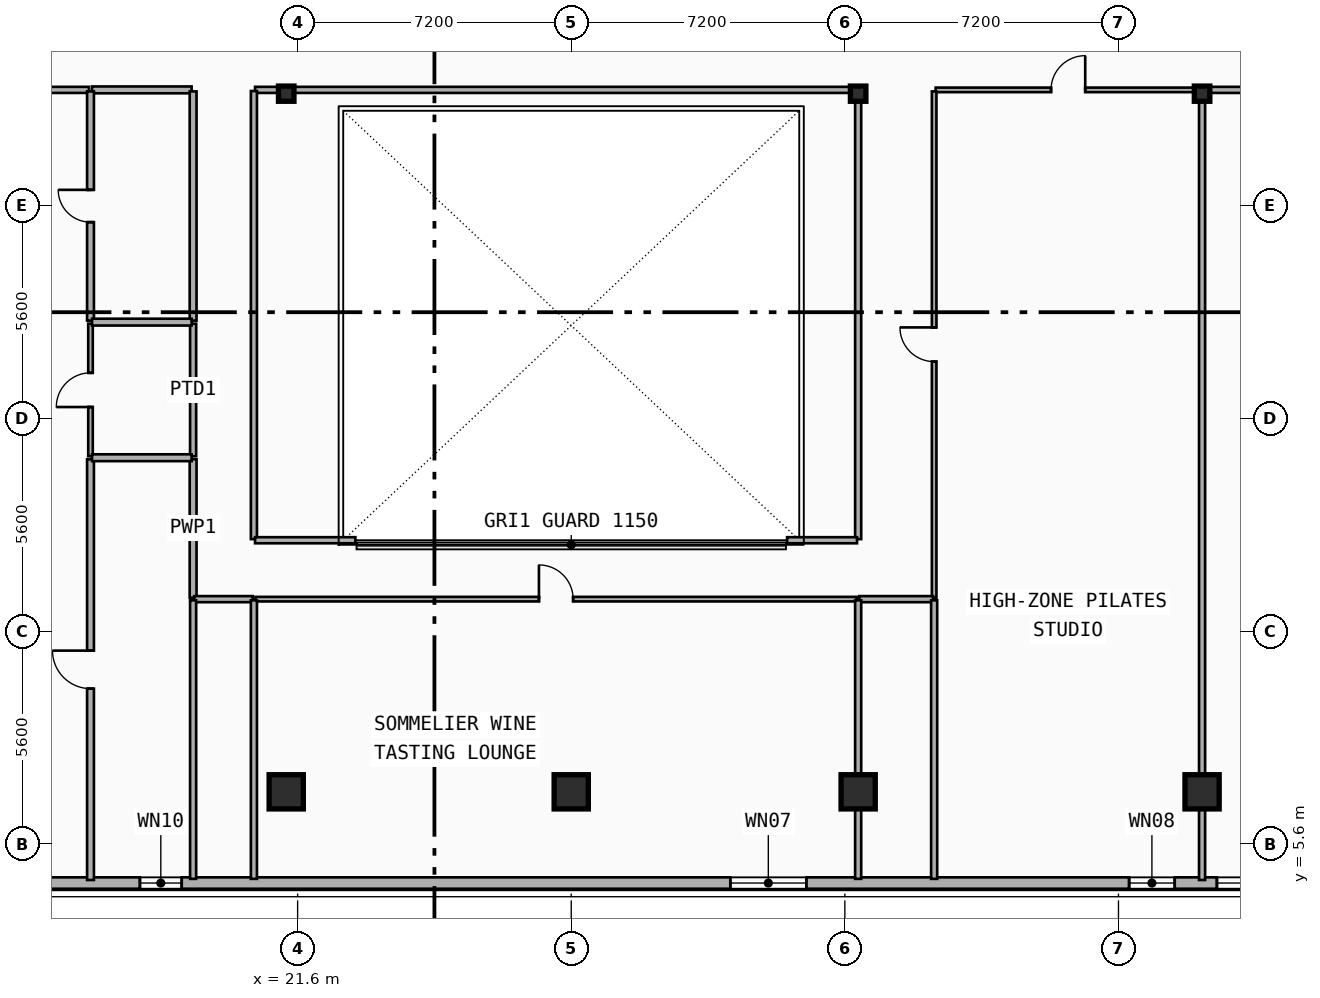
"""IFC4 building model, lengths in metres.
Left out: names, types, materials, properties, quantities, classifications, styles, units other than length and angle.
Written with IfcOpenShell. Run it as: python <this file> out.ifc"""

import sys

from ifc_helpers import new_model, si_unit, direction, frame, frame_2d, origin, origin_2d, place, context, subcontext, project, spatial, rectangle, i_section, extrude, element, fill, save


model = new_model("IFC4")
c1 = context("Model", 3, precision=1e-05, world=origin(), true_north=direction((0.0, 1.0)))
c2 = subcontext(c1, "Body", "Model", "MODEL_VIEW")
j1 = project(units=[si_unit("LENGTHUNIT", "METRE"), si_unit("PLANEANGLEUNIT", "RADIAN")], contexts=[c1])
p1 = place(None, origin())
s1 = spatial("IfcSite", under=j1, at=p1, CompositionType="ELEMENT")
p2 = place(p1, origin())
s2 = spatial("IfcBuilding", under=s1, at=p2, CompositionType="ELEMENT")
p3 = place(p2, frame((0.0, 0.0, 211.2)))
s3 = spatial("IfcBuildingStorey", under=s2, at=p3, CompositionType="ELEMENT", Elevation=211.2)
for number, where, z_axis, x_axis in (
    (1, (21.3, 25.35, 0.0), (0.0, 0.0, 1.0), (1.0, 0.0, 0.0)),
    (2, (36.35, 25.35, 0.0), (0.0, 0.0, 1.0), (1.0, 0.0, 0.0)),
    (3, (45.4, 25.35, 0.0), (0.0, 0.0, 1.0), (1.0, 0.0, 0.0)),
):
    element("IfcColumn", number, at=place(p3, frame(where, z_axis=z_axis, x_axis=x_axis)), inside=s3, PredefinedType="COLUMN", context=c2, shape_type="SweptSolid", body=[
        extrude(i_section(OverallWidth=0.408, OverallDepth=0.4, WebThickness=0.025, FlangeThickness=0.039, FilletRadius=0.015, at=origin_2d()), origin(), (0.0, 0.0, 1.0), 3.6),
    ])
for number, where, z_axis, x_axis in (
    (4, (21.3, 7.089, 0.0), (0.0, -0.09, 0.996), (1.0, 0.0, 0.0)),
    (5, (28.8, 7.089, 0.0), (0.0, -0.09, 0.996), (1.0, 0.0, 0.0)),
    (6, (36.35, 7.089, 0.0), (0.0, -0.09, 0.996), (1.0, 0.0, 0.0)),
    (7, (45.4, 7.089, 0.0), (0.0, -0.09, 0.996), (1.0, 0.0, 0.0)),
):
    element("IfcColumn", number, at=place(p3, frame(where, z_axis=z_axis, x_axis=x_axis)), inside=s3, PredefinedType="COLUMN", context=c2, shape_type="SweptSolid", body=[
        extrude(rectangle(XDim=0.9, YDim=0.9, at=origin_2d()), origin(), (0.0, 0.0, 1.0), 3.615),
    ])
p4 = place(p3, frame((48.0, 4.58, 0.0), z_axis=(0.0, 0.0, 1.0), x_axis=(-1.0, 0.0, 0.0)))
e8 = element("IfcWall", 8, at=p4, inside=s3, PredefinedType="SOLIDWALL", context=c2, shape_type="SweptSolid", body=[
    extrude(rectangle(XDim=38.4, YDim=0.3, at=frame_2d((19.2, 0.0))), origin(), (0.0, 0.0, 1.0), 3.34),
])
p5 = place(p4, frame((33.709, 0.0, 0.34)))
e9 = element("IfcOpeningElement", 9, at=p5, cuts=e8, PredefinedType="OPENING", context=c2, shape_type="SweptSolid", body=[
    extrude(rectangle(XDim=1.4, YDim=1.8, at=frame_2d((0.7, 0.9))), frame((0.0, 0.16, 0.0), z_axis=(0.0, -1.0, 0.0), x_axis=(1.0, 0.0, 0.0)), (0.0, 0.0, 1.0), 0.32),
])
p6 = place(p4, frame((29.45, 0.0, 1.85)))
e10 = element("IfcOpeningElement", 10, at=p6, cuts=e8, PredefinedType="OPENING", context=c2, shape_type="SweptSolid", body=[
    extrude(rectangle(XDim=1.1, YDim=0.9, at=frame_2d((0.55, 0.45))), frame((0.0, 0.16, 0.0), z_axis=(0.0, -1.0, 0.0), x_axis=(1.0, 0.0, 0.0)), (0.0, 0.0, 1.0), 0.32),
])
p7 = place(p4, frame((35.994, 0.0, 0.48)))
e11 = element("IfcOpeningElement", 11, at=p7, cuts=e8, PredefinedType="OPENING", context=c2, shape_type="SweptSolid", body=[
    extrude(rectangle(XDim=1.8, YDim=1.8, at=frame_2d((0.9, 0.9))), frame((0.0, 0.16, 0.0), z_axis=(0.0, -1.0, 0.0), x_axis=(1.0, 0.0, 0.0)), (0.0, 0.0, 1.0), 0.32),
])
p8 = place(p4, frame((13.014, 0.0, 0.65)))
e12 = element("IfcOpeningElement", 12, at=p8, cuts=e8, PredefinedType="OPENING", context=c2, shape_type="SweptSolid", body=[
    extrude(rectangle(XDim=2.0, YDim=2.2, at=frame_2d((1.0, 1.1))), frame((0.0, 0.16, 0.0), z_axis=(0.0, -1.0, 0.0), x_axis=(1.0, 0.0, 0.0)), (0.0, 0.0, 1.0), 0.32),
])
p9 = place(p4, frame((3.32, 0.0, 1.05)))
e13 = element("IfcOpeningElement", 13, at=p9, cuts=e8, PredefinedType="OPENING", context=c2, shape_type="SweptSolid", body=[
    extrude(rectangle(XDim=1.2, YDim=1.5, at=frame_2d((0.6, 0.75))), frame((0.0, 0.16, 0.0), z_axis=(0.0, -1.0, 0.0), x_axis=(1.0, 0.0, 0.0)), (0.0, 0.0, 1.0), 0.32),
])
p10 = place(p4, frame((0.41, 0.0, 0.48)))
e14 = element("IfcOpeningElement", 14, at=p10, cuts=e8, PredefinedType="OPENING", context=c2, shape_type="SweptSolid", body=[
    extrude(rectangle(XDim=1.8, YDim=1.8, at=frame_2d((0.9, 0.9))), frame((0.0, 0.16, 0.0), z_axis=(0.0, -1.0, 0.0), x_axis=(1.0, 0.0, 0.0)), (0.0, 0.0, 1.0), 0.32),
])
p11 = place(p3, frame((12.631, 25.45, 0.0), z_axis=(0.0, 0.0, 1.0), x_axis=(1.0, 0.0, 0.0)))
e15 = element("IfcWall", 15, at=p11, inside=s3, PredefinedType="PARTITIONING", context=c2, shape_type="SweptSolid", body=[
    extrude(rectangle(XDim=3.479, YDim=0.16, at=frame_2d((1.74, 0.0))), origin(), (0.0, 0.0, 1.0), 2.52),
])
p12 = place(p11, frame((1.24, 0.0, 0.0)))
e16 = element("IfcOpeningElement", 16, at=p12, cuts=e15, PredefinedType="OPENING", context=c2, shape_type="SweptSolid", body=[
    extrude(rectangle(XDim=1.0, YDim=2.15, at=frame_2d((0.5, 1.075))), frame((0.0, 0.09, 0.0), z_axis=(0.0, -1.0, 0.0), x_axis=(1.0, 0.0, 0.0)), (0.0, 0.0, 1.0), 0.18),
])
p13 = place(p3, frame((16.19, 25.45, 0.0), z_axis=(0.0, 0.0, 1.0), x_axis=(1.0, 0.0, 0.0)))
e17 = element("IfcWall", 17, at=p13, inside=s3, PredefinedType="PLUMBINGWALL", context=c2, shape_type="SweptSolid", body=[
    extrude(rectangle(XDim=2.62, YDim=0.18, at=frame_2d((1.31, 0.0))), origin(), (0.0, 0.0, 1.0), 3.34),
])
p14 = place(p3, frame((38.39, 25.45, 0.0), z_axis=(0.0, 0.0, 1.0), x_axis=(1.0, 0.0, 0.0)))
e18 = element("IfcWall", 18, at=p14, inside=s3, PredefinedType="PARTITIONING", context=c2, shape_type="SweptSolid", body=[
    extrude(rectangle(XDim=6.97, YDim=0.12, at=frame_2d((3.485, 0.0))), origin(), (0.0, 0.0, 1.0), 2.52),
])
p15 = place(p14, frame((3.035, 0.0, 0.0)))
e19 = element("IfcOpeningElement", 19, at=p15, cuts=e18, PredefinedType="OPENING", context=c2, shape_type="SweptSolid", body=[
    extrude(rectangle(XDim=0.9, YDim=2.1, at=frame_2d((0.45, 1.05))), frame((0.0, 0.07, 0.0), z_axis=(0.0, -1.0, 0.0), x_axis=(1.0, 0.0, 0.0)), (0.0, 0.0, 1.0), 0.14),
])
p16 = place(p3, frame((45.44, 25.45, 0.0), z_axis=(0.0, 0.0, 1.0), x_axis=(1.0, 0.0, 0.0)))
e20 = element("IfcWall", 20, at=p16, inside=s3, PredefinedType="PARTITIONING", context=c2, shape_type="SweptSolid", body=[
    extrude(rectangle(XDim=2.994, YDim=0.16, at=frame_2d((1.497, 0.0))), origin(), (0.0, 0.0, 1.0), 2.52),
])
p17 = place(p16, frame((0.997, 0.0, 0.0)))
e21 = element("IfcOpeningElement", 21, at=p17, cuts=e20, PredefinedType="OPENING", context=c2, shape_type="SweptSolid", body=[
    extrude(rectangle(XDim=1.0, YDim=2.15, at=frame_2d((0.5, 1.075))), frame((0.0, 0.09, 0.0), z_axis=(0.0, -1.0, 0.0), x_axis=(1.0, 0.0, 0.0)), (0.0, 0.0, 1.0), 0.18),
])
p18 = place(p3, frame((18.85, 12.09, 0.0), z_axis=(0.0, 0.0, 1.0), x_axis=(0.0, 1.0, 0.0)))
e22 = element("IfcWall", 22, at=p18, inside=s3, PredefinedType="PLUMBINGWALL", context=c2, shape_type="SweptSolid", body=[
    extrude(rectangle(XDim=3.641, YDim=0.18, at=frame_2d((1.82, 0.0))), origin(), (0.0, 0.0, 1.0), 2.82),
])
p19 = place(p3, frame((18.85, 15.811, 0.0), z_axis=(0.0, 0.0, 1.0), x_axis=(0.0, 1.0, 0.0)))
e23 = element("IfcWall", 23, at=p19, inside=s3, PredefinedType="PARTITIONING", context=c2, shape_type="SweptSolid", body=[
    extrude(rectangle(XDim=3.488, YDim=0.16, at=frame_2d((1.744, 0.0))), origin(), (0.0, 0.0, 1.0), 2.97),
])
p20 = place(p3, frame((18.85, 19.379, 0.0), z_axis=(0.0, 0.0, 1.0), x_axis=(0.0, 1.0, 0.0)))
e24 = element("IfcWall", 24, at=p20, inside=s3, PredefinedType="PLUMBINGWALL", context=c2, shape_type="SweptSolid", body=[
    extrude(rectangle(XDim=6.031, YDim=0.18, at=frame_2d((3.016, 0.0))), origin(), (0.0, 0.0, 1.0), 2.82),
])
p21 = place(p3, frame((38.35, 12.09, 0.0), z_axis=(0.0, 0.0, 1.0), x_axis=(0.0, 1.0, 0.0)))
e25 = element("IfcWall", 25, at=p21, inside=s3, PredefinedType="PARTITIONING", context=c2, shape_type="SweptSolid", body=[
    extrude(rectangle(XDim=13.32, YDim=0.12, at=frame_2d((6.66, 0.0))), origin(), (0.0, 0.0, 1.0), 2.82),
])
p22 = place(p21, frame((6.21, 0.0, 0.0)))
e26 = element("IfcOpeningElement", 26, at=p22, cuts=e25, PredefinedType="OPENING", context=c2, shape_type="SweptSolid", body=[
    extrude(rectangle(XDim=0.9, YDim=2.1, at=frame_2d((0.45, 1.05))), frame((0.0, 0.07, 0.0), z_axis=(0.0, -1.0, 0.0), x_axis=(1.0, 0.0, 0.0)), (0.0, 0.0, 1.0), 0.14),
])
p23 = place(p3, frame((20.49, 12.05, 0.0), z_axis=(0.0, 0.0, 1.0), x_axis=(1.0, 0.0, 0.0)))
e27 = element("IfcWall", 27, at=p23, inside=s3, PredefinedType="PARTITIONING", context=c2, shape_type="SweptSolid", body=[
    extrude(rectangle(XDim=15.82, YDim=0.12, at=frame_2d((7.91, 0.0))), origin(), (0.0, 0.0, 1.0), 2.52),
])
p24 = place(p23, frame((7.46, 0.0, 0.0)))
e28 = element("IfcOpeningElement", 28, at=p24, cuts=e27, PredefinedType="OPENING", context=c2, shape_type="SweptSolid", body=[
    extrude(rectangle(XDim=0.9, YDim=2.1, at=frame_2d((0.45, 1.05))), frame((0.0, 0.07, 0.0), z_axis=(0.0, -1.0, 0.0), x_axis=(1.0, 0.0, 0.0)), (0.0, 0.0, 1.0), 0.14),
])
p25 = place(p3, frame((16.15, 4.66, 0.0), z_axis=(0.0, 0.0, 1.0), x_axis=(0.0, 1.0, 0.0)))
e29 = element("IfcWall", 29, at=p25, inside=s3, PredefinedType="PLUMBINGWALL", context=c2, shape_type="SweptSolid", body=[
    extrude(rectangle(XDim=11.071, YDim=0.18, at=frame_2d((5.536, 0.0))), origin(), (0.0, 0.0, 1.0), 2.82),
])
p26 = place(p25, frame((5.035, 0.0, 0.0)))
e30 = element("IfcOpeningElement", 30, at=p26, cuts=e29, PredefinedType="OPENING", context=c2, shape_type="SweptSolid", body=[
    extrude(rectangle(XDim=1.0, YDim=2.15, at=frame_2d((0.5, 1.075))), frame((0.0, 0.1, 0.0), z_axis=(0.0, -1.0, 0.0), x_axis=(1.0, 0.0, 0.0)), (0.0, 0.0, 1.0), 0.2),
])
p27 = place(p3, frame((16.15, 15.811, 0.0), z_axis=(0.0, 0.0, 1.0), x_axis=(0.0, 1.0, 0.0)))
e31 = element("IfcWall", 31, at=p27, inside=s3, PredefinedType="PARTITIONING", context=c2, shape_type="SweptSolid", body=[
    extrude(rectangle(XDim=3.488, YDim=0.12, at=frame_2d((1.744, 0.0))), origin(), (0.0, 0.0, 1.0), 2.97),
])
p28 = place(p27, frame((1.294, 0.0, 0.0)))
e32 = element("IfcOpeningElement", 32, at=p28, cuts=e31, PredefinedType="OPENING", context=c2, shape_type="SweptSolid", body=[
    extrude(rectangle(XDim=0.9, YDim=2.1, at=frame_2d((0.45, 1.05))), frame((0.0, 0.07, 0.0), z_axis=(0.0, -1.0, 0.0), x_axis=(1.0, 0.0, 0.0)), (0.0, 0.0, 1.0), 0.14),
])
p29 = place(p3, frame((16.15, 19.379, 0.0), z_axis=(0.0, 0.0, 1.0), x_axis=(0.0, 1.0, 0.0)))
e33 = element("IfcWall", 33, at=p29, inside=s3, PredefinedType="PLUMBINGWALL", context=c2, shape_type="SweptSolid", body=[
    extrude(rectangle(XDim=6.031, YDim=0.18, at=frame_2d((3.016, 0.0))), origin(), (0.0, 0.0, 1.0), 2.82),
])
p30 = place(p29, frame((2.591, 0.0, 0.0)))
e34 = element("IfcOpeningElement", 34, at=p30, cuts=e33, PredefinedType="OPENING", context=c2, shape_type="SweptSolid", body=[
    extrude(rectangle(XDim=0.85, YDim=2.1, at=frame_2d((0.425, 1.05))), frame((0.0, 0.1, 0.0), z_axis=(0.0, -1.0, 0.0), x_axis=(1.0, 0.0, 0.0)), (0.0, 0.0, 1.0), 0.2),
])
p31 = place(p3, frame((16.19, 15.771, 0.0), z_axis=(0.0, 0.0, 1.0), x_axis=(1.0, 0.0, 0.0)))
e35 = element("IfcWall", 35, at=p31, inside=s3, PredefinedType="PLUMBINGWALL", context=c2, shape_type="SweptSolid", body=[
    extrude(rectangle(XDim=2.62, YDim=0.18, at=frame_2d((1.31, 0.0))), origin(), (0.0, 0.0, 1.0), 3.34),
])
p32 = place(p3, frame((16.19, 19.339, 0.0), z_axis=(0.0, 0.0, 1.0), x_axis=(1.0, 0.0, 0.0)))
e36 = element("IfcWall", 36, at=p32, inside=s3, PredefinedType="PLUMBINGWALL", context=c2, shape_type="SweptSolid", body=[
    extrude(rectangle(XDim=2.62, YDim=0.18, at=frame_2d((1.31, 0.0))), origin(), (0.0, 0.0, 1.0), 2.97),
])
p33 = place(p3, frame((45.4, 4.66, 0.0), z_axis=(0.0, 0.0, 1.0), x_axis=(0.0, 1.0, 0.0)))
e37 = element("IfcWall", 37, at=p33, inside=s3, PredefinedType="PARTITIONING", context=c2, shape_type="SweptSolid", body=[
    extrude(rectangle(XDim=20.75, YDim=0.16, at=frame_2d((10.375, 0.0))), origin(), (0.0, 0.0, 1.0), 2.52),
])
p34 = place(p3, frame((20.48, 25.45, 0.0), z_axis=(0.0, 0.0, 1.0), x_axis=(1.0, 0.0, 0.0)))
e38 = element("IfcWall", 38, at=p34, inside=s3, PredefinedType="PARTITIONING", context=c2, shape_type="SweptSolid", body=[
    extrude(rectangle(XDim=15.84, YDim=0.16, at=frame_2d((7.92, 0.0))), origin(), (0.0, 0.0, 1.0), 2.52),
])
p35 = place(p3, frame((18.88, 12.05, 0.0), z_axis=(0.0, 0.0, 1.0), x_axis=(1.0, 0.0, 0.0)))
e39 = element("IfcWall", 39, at=p35, inside=s3, PredefinedType="PARTITIONING", context=c2, shape_type="SweptSolid", body=[
    extrude(rectangle(XDim=1.54, YDim=0.16, at=frame_2d((0.77, 0.0))), origin(), (0.0, 0.0, 1.0), 3.34),
])
p36 = place(p3, frame((20.45, 13.63, 0.0), z_axis=(0.0, 0.0, 1.0), x_axis=(0.0, 1.0, 0.0)))
e40 = element("IfcWall", 40, at=p36, inside=s3, PredefinedType="PARTITIONING", context=c2, shape_type="SweptSolid", body=[
    extrude(rectangle(XDim=11.79, YDim=0.16, at=frame_2d((5.895, 0.0))), origin(), (0.0, 0.0, 1.0), 2.82),
])
p37 = place(p3, frame((36.38, 12.05, 0.0), z_axis=(0.0, 0.0, 1.0), x_axis=(1.0, 0.0, 0.0)))
e41 = element("IfcWall", 41, at=p37, inside=s3, PredefinedType="PARTITIONING", context=c2, shape_type="SweptSolid", body=[
    extrude(rectangle(XDim=1.94, YDim=0.16, at=frame_2d((0.97, 0.0))), origin(), (0.0, 0.0, 1.0), 2.52),
])
p38 = place(p3, frame((36.35, 13.63, 0.0), z_axis=(0.0, 0.0, 1.0), x_axis=(0.0, 1.0, 0.0)))
e42 = element("IfcWall", 42, at=p38, inside=s3, PredefinedType="PARTITIONING", context=c2, shape_type="SweptSolid", body=[
    extrude(rectangle(XDim=11.79, YDim=0.16, at=frame_2d((5.895, 0.0))), origin(), (0.0, 0.0, 1.0), 2.52),
])
p39 = place(p3, frame((20.48, 13.6, 0.0), z_axis=(0.0, 0.0, 1.0), x_axis=(1.0, 0.0, 0.0)))
e43 = element("IfcWall", 43, at=p39, inside=s3, PredefinedType="PARTITIONING", context=c2, shape_type="SweptSolid", body=[
    extrude(rectangle(XDim=2.64, YDim=0.16, at=frame_2d((1.32, 0.0))), origin(), (0.0, 0.0, 1.0), 2.52),
])
p40 = place(p3, frame((34.48, 13.6, 0.0), z_axis=(0.0, 0.0, 1.0), x_axis=(1.0, 0.0, 0.0)))
e44 = element("IfcWall", 44, at=p40, inside=s3, PredefinedType="PARTITIONING", context=c2, shape_type="SweptSolid", body=[
    extrude(rectangle(XDim=1.84, YDim=0.16, at=frame_2d((0.92, 0.0))), origin(), (0.0, 0.0, 1.0), 2.52),
])
for number, where, z_axis, x_axis in (
    (45, (18.85, 4.69, 0.0), (0.0, 0.0, 1.0), (0.0, 1.0, 0.0)),
    (46, (20.45, 4.69, 0.0), (0.0, 0.0, 1.0), (0.0, 1.0, 0.0)),
):
    element("IfcWall", number, at=place(p3, frame(where, z_axis=z_axis, x_axis=x_axis)), inside=s3, PredefinedType="PARTITIONING", context=c2, shape_type="SweptSolid", body=[
        extrude(rectangle(XDim=7.33, YDim=0.16, at=frame_2d((3.665, 0.0))), origin(), (0.0, 0.0, 1.0), 2.97),
    ])
p41 = place(p3, frame((36.35, 4.69, 0.0), z_axis=(0.0, 0.0, 1.0), x_axis=(0.0, 1.0, 0.0)))
e47 = element("IfcWall", 47, at=p41, inside=s3, PredefinedType="PARTITIONING", context=c2, shape_type="SweptSolid", body=[
    extrude(rectangle(XDim=7.33, YDim=0.16, at=frame_2d((3.665, 0.0))), origin(), (0.0, 0.0, 1.0), 2.52),
])
p42 = place(p3, frame((38.35, 4.69, 0.0), z_axis=(0.0, 0.0, 1.0), x_axis=(0.0, 1.0, 0.0)))
e48 = element("IfcWall", 48, at=p42, inside=s3, PredefinedType="PARTITIONING", context=c2, shape_type="SweptSolid", body=[
    extrude(rectangle(XDim=7.33, YDim=0.16, at=frame_2d((3.665, 0.0))), origin(), (0.0, 0.0, 1.0), 2.97),
])
p43 = place(p6, origin())
e49 = element("IfcWindow", 49, at=p43, inside=s3, PartitioningType="SINGLE_PANEL", PredefinedType="WINDOW", context=c2, shape_type="SweptSolid", body=[
    extrude(rectangle(XDim=1.1, YDim=0.9, at=frame_2d((0.55, 0.45))), frame((0.0, 0.03, 0.0), z_axis=(0.0, -1.0, 0.0), x_axis=(1.0, 0.0, 0.0)), (0.0, 0.0, 1.0), 0.06),
])
fill(e10, e49)
p44 = place(p8, origin())
e50 = element("IfcWindow", 50, at=p44, inside=s3, PartitioningType="SINGLE_PANEL", PredefinedType="WINDOW", context=c2, shape_type="SweptSolid", body=[
    extrude(rectangle(XDim=2.0, YDim=2.2, at=frame_2d((1.0, 1.1))), frame((0.0, 0.03, 0.0), z_axis=(0.0, -1.0, 0.0), x_axis=(1.0, 0.0, 0.0)), (0.0, 0.0, 1.0), 0.06),
])
fill(e12, e50)
p45 = place(p9, origin())
e51 = element("IfcWindow", 51, at=p45, inside=s3, PartitioningType="SINGLE_PANEL", PredefinedType="WINDOW", context=c2, shape_type="SweptSolid", body=[
    extrude(rectangle(XDim=1.2, YDim=1.5, at=frame_2d((0.6, 0.75))), frame((0.0, 0.03, 0.0), z_axis=(0.0, -1.0, 0.0), x_axis=(1.0, 0.0, 0.0)), (0.0, 0.0, 1.0), 0.06),
])
fill(e13, e51)
p46 = place(p10, origin())
e52 = element("IfcWindow", 52, at=p46, inside=s3, PartitioningType="SINGLE_PANEL", PredefinedType="WINDOW", context=c2, shape_type="SweptSolid", body=[
    extrude(rectangle(XDim=1.8, YDim=1.8, at=frame_2d((0.9, 0.9))), frame((0.0, 0.03, 0.0), z_axis=(0.0, -1.0, 0.0), x_axis=(1.0, 0.0, 0.0)), (0.0, 0.0, 1.0), 0.06),
])
fill(e14, e52)
p47 = place(p15, origin())
e53 = element("IfcDoor", 53, at=p47, inside=s3, OperationType="SINGLE_SWING_RIGHT", PredefinedType="DOOR", context=c2, shape_type="SweptSolid", body=[
    extrude(rectangle(XDim=0.9, YDim=2.1, at=frame_2d((0.45, 1.05))), frame((0.0, 0.025, 0.0), z_axis=(0.0, -1.0, 0.0), x_axis=(1.0, 0.0, 0.0)), (0.0, 0.0, 1.0), 0.05),
])
fill(e19, e53)
p48 = place(p22, origin())
e54 = element("IfcDoor", 54, at=p48, inside=s3, OperationType="SINGLE_SWING_RIGHT", PredefinedType="DOOR", context=c2, shape_type="SweptSolid", body=[
    extrude(rectangle(XDim=0.9, YDim=2.1, at=frame_2d((0.45, 1.05))), frame((0.0, 0.025, 0.0), z_axis=(0.0, -1.0, 0.0), x_axis=(1.0, 0.0, 0.0)), (0.0, 0.0, 1.0), 0.05),
])
fill(e26, e54)
p49 = place(p24, origin())
e55 = element("IfcDoor", 55, at=p49, inside=s3, OperationType="SINGLE_SWING_LEFT", PredefinedType="DOOR", context=c2, shape_type="SweptSolid", body=[
    extrude(rectangle(XDim=0.9, YDim=2.1, at=frame_2d((0.45, 1.05))), frame((0.0, 0.025, 0.0), z_axis=(0.0, -1.0, 0.0), x_axis=(1.0, 0.0, 0.0)), (0.0, 0.0, 1.0), 0.05),
])
fill(e28, e55)
p50 = place(p26, origin())
e56 = element("IfcDoor", 56, at=p50, inside=s3, OperationType="SINGLE_SWING_RIGHT", PredefinedType="DOOR", context=c2, shape_type="SweptSolid", body=[
    extrude(rectangle(XDim=1.0, YDim=2.15, at=frame_2d((0.5, 1.075))), frame((0.0, 0.025, 0.0), z_axis=(0.0, -1.0, 0.0), x_axis=(1.0, 0.0, 0.0)), (0.0, 0.0, 1.0), 0.05),
])
fill(e30, e56)
p51 = place(p28, origin())
e57 = element("IfcDoor", 57, at=p51, inside=s3, OperationType="SINGLE_SWING_LEFT", PredefinedType="DOOR", context=c2, shape_type="SweptSolid", body=[
    extrude(rectangle(XDim=0.9, YDim=2.1, at=frame_2d((0.45, 1.05))), frame((0.0, 0.025, 0.0), z_axis=(0.0, -1.0, 0.0), x_axis=(1.0, 0.0, 0.0)), (0.0, 0.0, 1.0), 0.05),
])
fill(e32, e57)
p52 = place(p30, origin())
e58 = element("IfcDoor", 58, at=p52, inside=s3, OperationType="SINGLE_SWING_RIGHT", PredefinedType="DOOR", context=c2, shape_type="SweptSolid", body=[
    extrude(rectangle(XDim=0.85, YDim=2.1, at=frame_2d((0.425, 1.05))), frame((0.0, 0.025, 0.0), z_axis=(0.0, -1.0, 0.0), x_axis=(1.0, 0.0, 0.0)), (0.0, 0.0, 1.0), 0.05),
])
fill(e34, e58)
save(model, sys.argv[1])
